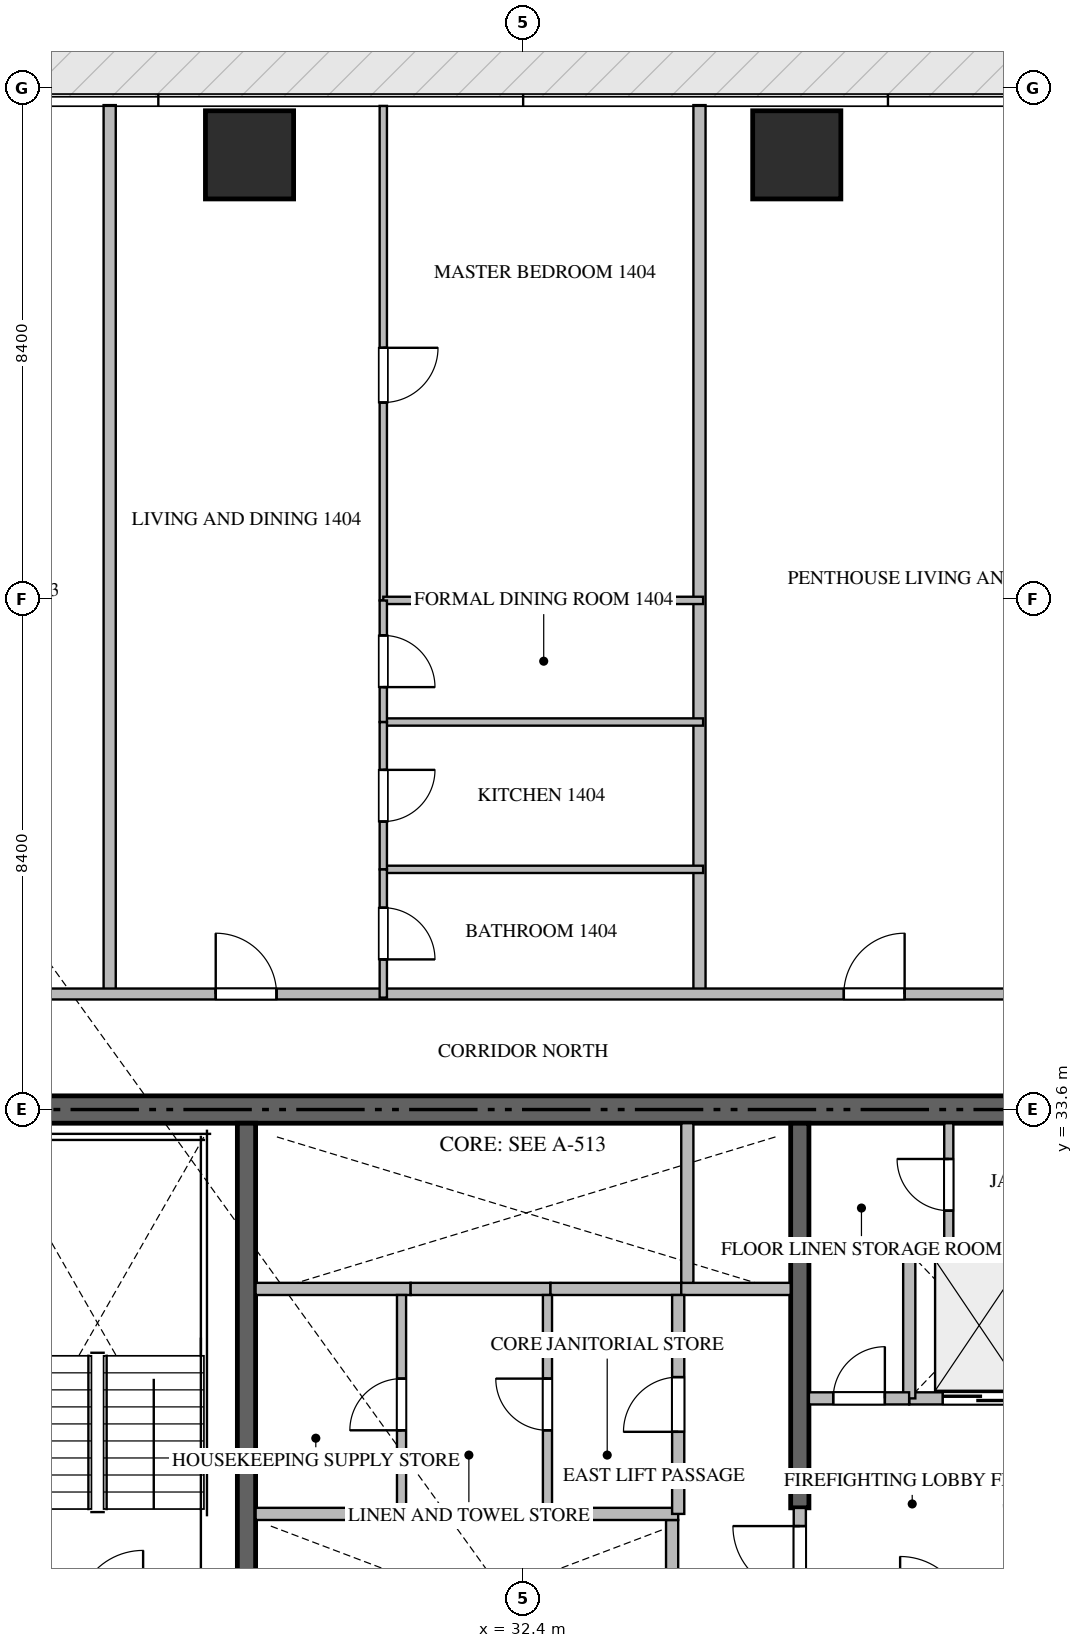
"""IFC4 building model, lengths in metres.
Left out: names, types, materials, properties, quantities, classifications, styles, units other than length and angle.
Written with IfcOpenShell. Run it as: python <this file> out.ifc"""

import sys

from ifc_helpers import new_model, si_unit, direction, frame, frame_2d, origin, origin_2d, place, context, subcontext, project, spatial, rectangle, extrude, source, transform, mapped, element, fill, save


model = new_model("IFC4")
c1 = context("Model", 3, precision=1e-05, world=origin(), true_north=direction((0.0, 1.0)))
c2 = subcontext(c1, "Body", "Model", "MODEL_VIEW")
j1 = project(units=[si_unit("LENGTHUNIT", "METRE"), si_unit("PLANEANGLEUNIT", "RADIAN")], contexts=[c1])
p1 = place(None, origin())
s1 = spatial("IfcSite", under=j1, at=p1, CompositionType="ELEMENT")
p2 = place(p1, origin())
s2 = spatial("IfcBuilding", under=s1, at=p2, CompositionType="ELEMENT")
p3 = place(p2, frame((0.0, 0.0, 60.45)))
s3 = spatial("IfcBuildingStorey", under=s2, at=p3, CompositionType="ELEMENT", Elevation=60.45)
p4 = place(p3, frame((41.4, 33.6, -0.26), z_axis=(0.0, 0.0, 1.0), x_axis=(-1.0, 0.0, 0.0)))
e1 = element("IfcWall", 1, at=p4, inside=s3, PredefinedType="SHEAR", context=c2, shape_type="SweptSolid", body=[
    extrude(rectangle(XDim=18.0, YDim=0.45, at=frame_2d((9.0, 0.0))), origin(), (0.0, 0.0, 1.0), 3.748),
])
p5 = place(p3, frame((27.85, 23.55, -0.26), z_axis=(0.0, 0.0, 1.0), x_axis=(0.0, 1.0, 0.0)))
e2 = element("IfcWall", 2, at=p5, inside=s3, PredefinedType="SHEAR", context=c2, shape_type="SweptSolid", body=[
    extrude(rectangle(XDim=9.825, YDim=0.3, at=frame_2d((4.913, 0.0))), origin(), (0.0, 0.0, 1.0), 3.748),
])
p6 = place(p3, frame((36.95, 27.05, -0.26), z_axis=(0.0, 0.0, 1.0), x_axis=(0.0, 1.0, 0.0)))
e3 = element("IfcWall", 3, at=p6, inside=s3, PredefinedType="SHEAR", context=c2, shape_type="SweptSolid", body=[
    extrude(rectangle(XDim=6.325, YDim=0.3, at=frame_2d((3.163, 0.0))), origin(), (0.0, 0.0, 1.0), 3.748),
])
m1 = source(origin(), c2, "Body", "SweptSolid", [
    extrude(rectangle(XDim=1.45, YDim=1.45, at=origin_2d()), origin(), (0.0, 0.0, 1.0), 3.75),
])
for number, where, z_axis, x_axis in (
    (4, (27.9, 49.3, -0.26), (0.0, 0.0, 1.0), (1.0, 0.0, 0.0)),
    (5, (36.9, 49.3, -0.26), (0.0, 0.0, 1.0), (1.0, 0.0, 0.0)),
):
    element("IfcColumn", number, at=place(p3, frame(where, z_axis=z_axis, x_axis=x_axis)), inside=s3, PredefinedType="COLUMN", context=c2, shape_type="MappedRepresentation", body=[
        mapped(m1, transform((0.0, 0.0, 0.0), scale=1.0)),
    ])
p7 = place(p3, frame((38.75, 28.85, 0.0), z_axis=(0.0, 0.0, 1.0), x_axis=(1.0, 0.0, 0.0)))
e6 = element("IfcWall", 6, at=p7, inside=s3, PredefinedType="STANDARD", context=c2, shape_type="SweptSolid", body=[
    extrude(rectangle(XDim=2.425, YDim=0.2, at=frame_2d((1.212, 0.0))), origin(), (0.0, 0.0, 1.0), 3.49),
])
p8 = place(p7, frame((0.55, 0.0, 0.0)))
e7 = element("IfcOpeningElement", 7, at=p8, cuts=e6, PredefinedType="OPENING", context=c2, shape_type="SweptSolid", body=[
    extrude(rectangle(XDim=1.2, YDim=2.2, at=frame_2d((0.6, 1.1))), frame((0.0, 0.11, 0.0), z_axis=(0.0, -1.0, 0.0), x_axis=(1.0, 0.0, 0.0)), (0.0, 0.0, 1.0), 0.22),
])
p9 = place(p3, frame((34.85, 24.35, 0.0), z_axis=(0.0, 0.0, 1.0), x_axis=(0.0, 1.0, 0.0)))
e8 = element("IfcWall", 8, at=p9, inside=s3, PredefinedType="STANDARD", context=c2, shape_type="SweptSolid", body=[
    extrude(rectangle(XDim=2.5, YDim=0.2, at=frame_2d((1.25, 0.0))), origin(), (0.0, 0.0, 1.0), 3.49),
])
p10 = place(p3, frame((28.0, 30.65, 0.0), z_axis=(0.0, 0.0, 1.0), x_axis=(1.0, 0.0, 0.0)))
e9 = element("IfcWall", 9, at=p10, inside=s3, PredefinedType="STANDARD", context=c2, shape_type="SweptSolid", body=[
    extrude(rectangle(XDim=2.55, YDim=0.2, at=frame_2d((1.275, 0.0))), origin(), (0.0, 0.0, 1.0), 3.49),
])
p11 = place(p3, frame((30.55, 30.65, 0.0), z_axis=(0.0, 0.0, 1.0), x_axis=(1.0, 0.0, 0.0)))
e10 = element("IfcWall", 10, at=p11, inside=s3, PredefinedType="STANDARD", context=c2, shape_type="SweptSolid", body=[
    extrude(rectangle(XDim=2.3, YDim=0.2, at=frame_2d((1.15, 0.0))), origin(), (0.0, 0.0, 1.0), 3.49),
])
p12 = place(p3, frame((32.85, 30.65, 0.0), z_axis=(0.0, 0.0, 1.0), x_axis=(1.0, 0.0, 0.0)))
e11 = element("IfcWall", 11, at=p12, inside=s3, PredefinedType="STANDARD", context=c2, shape_type="SweptSolid", body=[
    extrude(rectangle(XDim=2.15, YDim=0.2, at=frame_2d((1.075, 0.0))), origin(), (0.0, 0.0, 1.0), 3.49),
])
p13 = place(p3, frame((35.0, 30.65, 0.0), z_axis=(0.0, 0.0, 1.0), x_axis=(1.0, 0.0, 0.0)))
e12 = element("IfcWall", 12, at=p13, inside=s3, PredefinedType="STANDARD", context=c2, shape_type="SweptSolid", body=[
    extrude(rectangle(XDim=1.8, YDim=0.2, at=frame_2d((0.9, 0.0))), origin(), (0.0, 0.0, 1.0), 3.49),
])
p14 = place(p3, frame((35.1, 30.75, 0.0), z_axis=(0.0, 0.0, 1.0), x_axis=(0.0, 1.0, 0.0)))
e13 = element("IfcWall", 13, at=p14, inside=s3, PredefinedType="STANDARD", context=c2, shape_type="SweptSolid", body=[
    extrude(rectangle(XDim=2.625, YDim=0.2, at=frame_2d((1.312, 0.0))), origin(), (0.0, 0.0, 1.0), 3.49),
])
p15 = place(p3, frame((38.75, 28.85, 0.0), z_axis=(0.0, 0.0, 1.0), x_axis=(0.0, 1.0, 0.0)))
e14 = element("IfcWall", 14, at=p15, inside=s3, PredefinedType="STANDARD", context=c2, shape_type="SweptSolid", body=[
    extrude(rectangle(XDim=2.5, YDim=0.2, at=frame_2d((1.25, 0.0))), origin(), (0.0, 0.0, 1.0), 3.49),
])
p16 = place(p3, frame((38.75, 31.35, 0.0), z_axis=(0.0, 0.0, 1.0), x_axis=(1.0, 0.0, 0.0)))
e15 = element("IfcWall", 15, at=p16, inside=s3, PredefinedType="STANDARD", context=c2, shape_type="SweptSolid", body=[
    extrude(rectangle(XDim=2.425, YDim=0.2, at=frame_2d((1.212, 0.0))), origin(), (0.0, 0.0, 1.0), 3.49),
])
p17 = place(p3, frame((37.1, 28.85, 0.0), z_axis=(0.0, 0.0, 1.0), x_axis=(1.0, 0.0, 0.0)))
e16 = element("IfcWall", 16, at=p17, inside=s3, PredefinedType="STANDARD", context=c2, shape_type="SweptSolid", body=[
    extrude(rectangle(XDim=1.648, YDim=0.2, at=frame_2d((0.824, 0.0))), origin(), (0.0, 0.0, 1.0), 3.49),
])
p18 = place(p17, frame((0.399, 0.0, 0.0)))
e17 = element("IfcOpeningElement", 17, at=p18, cuts=e16, PredefinedType="OPENING", context=c2, shape_type="SweptSolid", body=[
    extrude(rectangle(XDim=0.85, YDim=2.1, at=frame_2d((0.425, 1.05))), frame((0.0, 0.11, 0.0), z_axis=(0.0, -1.0, 0.0), x_axis=(1.0, 0.0, 0.0)), (0.0, 0.0, 1.0), 0.22),
])
p19 = place(p3, frame((36.95, 25.352, 0.0), z_axis=(0.0, 0.0, 1.0), x_axis=(0.0, 1.0, 0.0)))
e18 = element("IfcWall", 18, at=p19, inside=s3, PredefinedType="STANDARD", context=c2, shape_type="SweptSolid", body=[
    extrude(rectangle(XDim=1.696, YDim=0.2, at=frame_2d((0.848, 0.0))), origin(), (0.0, 0.0, 1.0), 3.49),
])
p20 = place(p19, frame((0.298, 0.0, 0.0)))
e19 = element("IfcOpeningElement", 19, at=p20, cuts=e18, PredefinedType="OPENING", context=c2, shape_type="SweptSolid", body=[
    extrude(rectangle(XDim=1.1, YDim=2.15, at=frame_2d((0.55, 1.075))), frame((0.0, 0.11, 0.0), z_axis=(0.0, -1.0, 0.0), x_axis=(1.0, 0.0, 0.0)), (0.0, 0.0, 1.0), 0.22),
])
p21 = place(p3, frame((28.0, 26.95, 0.0), z_axis=(0.0, 0.0, 1.0), x_axis=(1.0, 0.0, 0.0)))
e20 = element("IfcWall", 20, at=p21, inside=s3, PredefinedType="STANDARD", context=c2, shape_type="SweptSolid", body=[
    extrude(rectangle(XDim=6.95, YDim=0.2, at=frame_2d((3.475, 0.0))), origin(), (0.0, 0.0, 1.0), 3.49),
])
p22 = place(p3, frame((39.4, 31.35, 0.0), z_axis=(0.0, 0.0, 1.0), x_axis=(0.0, 1.0, 0.0)))
e21 = element("IfcWall", 21, at=p22, inside=s3, PredefinedType="PARTITIONING", context=c2, shape_type="SweptSolid", body=[
    extrude(rectangle(XDim=2.025, YDim=0.15, at=frame_2d((1.012, 0.0))), origin(), (0.0, 0.0, 1.0), 3.49),
])
p23 = place(p22, frame((0.587, 0.0, 0.0)))
e22 = element("IfcOpeningElement", 22, at=p23, cuts=e21, PredefinedType="OPENING", context=c2, shape_type="SweptSolid", body=[
    extrude(rectangle(XDim=0.85, YDim=2.1, at=frame_2d((0.425, 1.05))), frame((0.0, 0.085, 0.0), z_axis=(0.0, -1.0, 0.0), x_axis=(1.0, 0.0, 0.0)), (0.0, 0.0, 1.0), 0.17),
])
p24 = place(p3, frame((34.95, 26.95, 0.0), z_axis=(0.0, 0.0, 1.0), x_axis=(0.0, 1.0, 0.0)))
e23 = element("IfcWall", 23, at=p24, inside=s3, PredefinedType="STANDARD", context=c2, shape_type="SweptSolid", body=[
    extrude(rectangle(XDim=3.6, YDim=0.2, at=frame_2d((1.8, 0.0))), origin(), (0.0, 0.0, 1.0), 3.49),
])
p25 = place(p24, frame((1.35, 0.0, 0.0)))
e24 = element("IfcOpeningElement", 24, at=p25, cuts=e23, PredefinedType="OPENING", context=c2, shape_type="SweptSolid", body=[
    extrude(rectangle(XDim=0.9, YDim=2.1, at=frame_2d((0.45, 1.05))), frame((0.0, 0.11, 0.0), z_axis=(0.0, -1.0, 0.0), x_axis=(1.0, 0.0, 0.0)), (0.0, 0.0, 1.0), 0.22),
])
p26 = place(p3, frame((32.8, 26.95, 0.0), z_axis=(0.0, 0.0, 1.0), x_axis=(0.0, 1.0, 0.0)))
e25 = element("IfcWall", 25, at=p26, inside=s3, PredefinedType="PARTITIONING", context=c2, shape_type="SweptSolid", body=[
    extrude(rectangle(XDim=3.6, YDim=0.15, at=frame_2d((1.8, 0.0))), origin(), (0.0, 0.0, 1.0), 3.49),
])
p27 = place(p26, frame((1.375, 0.0, 0.0)))
e26 = element("IfcOpeningElement", 26, at=p27, cuts=e25, PredefinedType="OPENING", context=c2, shape_type="SweptSolid", body=[
    extrude(rectangle(XDim=0.85, YDim=2.1, at=frame_2d((0.425, 1.05))), frame((0.0, 0.085, 0.0), z_axis=(0.0, -1.0, 0.0), x_axis=(1.0, 0.0, 0.0)), (0.0, 0.0, 1.0), 0.17),
])
p28 = place(p3, frame((30.4, 26.95, 0.0), z_axis=(0.0, 0.0, 1.0), x_axis=(0.0, 1.0, 0.0)))
e27 = element("IfcWall", 27, at=p28, inside=s3, PredefinedType="PARTITIONING", context=c2, shape_type="SweptSolid", body=[
    extrude(rectangle(XDim=3.6, YDim=0.15, at=frame_2d((1.8, 0.0))), origin(), (0.0, 0.0, 1.0), 3.49),
])
p29 = place(p28, frame((1.375, 0.0, 0.0)))
e28 = element("IfcOpeningElement", 28, at=p29, cuts=e27, PredefinedType="OPENING", context=c2, shape_type="SweptSolid", body=[
    extrude(rectangle(XDim=0.85, YDim=2.1, at=frame_2d((0.425, 1.05))), frame((0.0, 0.085, 0.0), z_axis=(0.0, -1.0, 0.0), x_axis=(1.0, 0.0, 0.0)), (0.0, 0.0, 1.0), 0.17),
])
for number, where, z_axis, x_axis in (
    (29, (25.6, 35.5, 0.0), (0.0, 0.0, 1.0), (0.0, 1.0, 0.0)),
    (30, (35.3, 35.5, 0.0), (0.0, 0.0, 1.0), (0.0, 1.0, 0.0)),
):
    element("IfcWall", number, at=place(p3, frame(where, z_axis=z_axis, x_axis=x_axis)), inside=s3, PredefinedType="PARTITIONING", context=c2, shape_type="SweptSolid", body=[
        extrude(rectangle(XDim=14.618, YDim=0.2, at=frame_2d((7.309, 0.0))), origin(), (0.0, 0.0, 1.0), 3.49),
    ])
p30 = place(p3, frame((21.402, 35.5, 0.0), z_axis=(0.0, 0.0, 1.0), x_axis=(1.0, 0.0, 0.0)))
e31 = element("IfcWall", 31, at=p30, inside=s3, PredefinedType="PARTITIONING", context=c2, shape_type="SweptSolid", body=[
    extrude(rectangle(XDim=21.996, YDim=0.18, at=frame_2d((10.998, 0.0))), origin(), (0.0, 0.0, 1.0), 3.49),
])
p31 = place(p30, frame((2.1, 0.0, 0.0)))
e32 = element("IfcOpeningElement", 32, at=p31, cuts=e31, PredefinedType="OPENING", context=c2, shape_type="SweptSolid", body=[
    extrude(rectangle(XDim=1.0, YDim=2.15, at=frame_2d((0.5, 1.075))), frame((0.0, 0.1, 0.0), z_axis=(0.0, -1.0, 0.0), x_axis=(1.0, 0.0, 0.0)), (0.0, 0.0, 1.0), 0.2),
])
p32 = place(p30, frame((5.942, 0.0, 0.0)))
e33 = element("IfcOpeningElement", 33, at=p32, cuts=e31, PredefinedType="OPENING", context=c2, shape_type="SweptSolid", body=[
    extrude(rectangle(XDim=1.0, YDim=2.15, at=frame_2d((0.5, 1.075))), frame((0.0, 0.1, 0.0), z_axis=(0.0, -1.0, 0.0), x_axis=(1.0, 0.0, 0.0)), (0.0, 0.0, 1.0), 0.2),
])
p33 = place(p30, frame((16.272, 0.0, 0.0)))
e34 = element("IfcOpeningElement", 34, at=p33, cuts=e31, PredefinedType="OPENING", context=c2, shape_type="SweptSolid", body=[
    extrude(rectangle(XDim=1.0, YDim=2.15, at=frame_2d((0.5, 1.075))), frame((0.0, 0.1, 0.0), z_axis=(0.0, -1.0, 0.0), x_axis=(1.0, 0.0, 0.0)), (0.0, 0.0, 1.0), 0.2),
])
p34 = place(p3, frame((30.1, 50.105, 0.0), z_axis=(0.0, 0.0, 1.0), x_axis=(0.0, -1.0, 0.0)))
e35 = element("IfcWall", 35, at=p34, inside=s3, PredefinedType="PARTITIONING", context=c2, shape_type="SweptSolid", body=[
    extrude(rectangle(XDim=8.132, YDim=0.12, at=frame_2d((4.066, 0.0))), origin(), (0.0, 0.0, 1.0), 3.49),
])
p35 = place(p34, frame((3.978, 0.0, 0.0)))
e36 = element("IfcOpeningElement", 36, at=p35, cuts=e35, PredefinedType="OPENING", context=c2, shape_type="SweptSolid", body=[
    extrude(rectangle(XDim=0.9, YDim=2.1, at=frame_2d((0.45, 1.05))), frame((0.0, 0.07, 0.0), z_axis=(0.0, -1.0, 0.0), x_axis=(1.0, 0.0, 0.0)), (0.0, 0.0, 1.0), 0.14),
])
for number, where, z_axis, x_axis in (
    (37, (30.1, 41.973, 0.0), (0.0, 0.0, 1.0), (1.0, 0.0, 0.0)),
    (38, (30.1, 39.973, 0.0), (0.0, 0.0, 1.0), (1.0, 0.0, 0.0)),
    (39, (30.1, 37.55, 0.0), (0.0, 0.0, 1.0), (1.0, 0.0, 0.0)),
):
    element("IfcWall", number, at=place(p3, frame(where, z_axis=z_axis, x_axis=x_axis)), inside=s3, PredefinedType="PARTITIONING", context=c2, shape_type="SweptSolid", body=[
        extrude(rectangle(XDim=5.26, YDim=0.12, at=frame_2d((2.63, 0.0))), origin(), (0.0, 0.0, 1.0), 3.49),
    ])
p36 = place(p3, frame((30.1, 41.971, 0.0), z_axis=(0.0, 0.0, 1.0), x_axis=(0.0, -1.0, 0.0)))
e40 = element("IfcWall", 40, at=p36, inside=s3, PredefinedType="PARTITIONING", context=c2, shape_type="SweptSolid", body=[
    extrude(rectangle(XDim=1.998, YDim=0.12, at=frame_2d((0.999, 0.0))), origin(), (0.0, 0.0, 1.0), 3.49),
])
p37 = place(p36, frame((0.574, 0.0, 0.0)))
e41 = element("IfcOpeningElement", 41, at=p37, cuts=e40, PredefinedType="OPENING", context=c2, shape_type="SweptSolid", body=[
    extrude(rectangle(XDim=0.85, YDim=2.1, at=frame_2d((0.425, 1.05))), frame((0.0, 0.07, 0.0), z_axis=(0.0, -1.0, 0.0), x_axis=(1.0, 0.0, 0.0)), (0.0, 0.0, 1.0), 0.14),
])
p38 = place(p3, frame((30.1, 39.971, 0.0), z_axis=(0.0, 0.0, 1.0), x_axis=(0.0, -1.0, 0.0)))
e42 = element("IfcWall", 42, at=p38, inside=s3, PredefinedType="PARTITIONING", context=c2, shape_type="SweptSolid", body=[
    extrude(rectangle(XDim=2.421, YDim=0.12, at=frame_2d((1.21, 0.0))), origin(), (0.0, 0.0, 1.0), 3.49),
])
p39 = place(p38, frame((0.785, 0.0, 0.0)))
e43 = element("IfcOpeningElement", 43, at=p39, cuts=e42, PredefinedType="OPENING", context=c2, shape_type="SweptSolid", body=[
    extrude(rectangle(XDim=0.85, YDim=2.1, at=frame_2d((0.425, 1.05))), frame((0.0, 0.07, 0.0), z_axis=(0.0, -1.0, 0.0), x_axis=(1.0, 0.0, 0.0)), (0.0, 0.0, 1.0), 0.14),
])
p40 = place(p3, frame((30.1, 37.548, 0.0), z_axis=(0.0, 0.0, 1.0), x_axis=(0.0, -1.0, 0.0)))
e44 = element("IfcWall", 44, at=p40, inside=s3, PredefinedType="PARTITIONING", context=c2, shape_type="SweptSolid", body=[
    extrude(rectangle(XDim=2.108, YDim=0.12, at=frame_2d((1.054, 0.0))), origin(), (0.0, 0.0, 1.0), 3.49),
])
p41 = place(p40, frame((0.629, 0.0, 0.0)))
e45 = element("IfcOpeningElement", 45, at=p41, cuts=e44, PredefinedType="OPENING", context=c2, shape_type="SweptSolid", body=[
    extrude(rectangle(XDim=0.85, YDim=2.1, at=frame_2d((0.425, 1.05))), frame((0.0, 0.07, 0.0), z_axis=(0.0, -1.0, 0.0), x_axis=(1.0, 0.0, 0.0)), (0.0, 0.0, 1.0), 0.14),
])
m2 = source(origin(), c2, "Body", "SweptSolid", [
    extrude(rectangle(XDim=1.2, YDim=2.2, at=frame_2d((0.6, 1.1))), frame((0.0, 0.025, 0.0), z_axis=(0.0, -1.0, 0.0), x_axis=(1.0, 0.0, 0.0)), (0.0, 0.0, 1.0), 0.05),
])
p42 = place(p8, origin())
e46 = element("IfcDoor", 46, at=p42, inside=s3, OperationType="DOUBLE_DOOR_SLIDING", PredefinedType="DOOR", context=c2, shape_type="MappedRepresentation", body=[
    mapped(m2, transform((0.0, 0.0, 0.0), scale=1.0)),
])
fill(e7, e46)
m3 = source(origin(), c2, "Body", "SweptSolid", [
    extrude(rectangle(XDim=0.85, YDim=2.1, at=frame_2d((0.425, 1.05))), frame((0.0, 0.025, 0.0), z_axis=(0.0, -1.0, 0.0), x_axis=(1.0, 0.0, 0.0)), (0.0, 0.0, 1.0), 0.05),
])
p43 = place(p18, origin())
e47 = element("IfcDoor", 47, at=p43, inside=s3, OperationType="SINGLE_SWING_RIGHT", PredefinedType="DOOR", context=c2, shape_type="MappedRepresentation", body=[
    mapped(m3, transform((0.0, 0.0, 0.0), scale=1.0)),
])
fill(e17, e47)
m4 = source(origin(), c2, "Body", "SweptSolid", [
    extrude(rectangle(XDim=1.1, YDim=2.15, at=frame_2d((0.55, 1.075))), frame((0.0, 0.025, 0.0), z_axis=(0.0, -1.0, 0.0), x_axis=(1.0, 0.0, 0.0)), (0.0, 0.0, 1.0), 0.05),
])
p44 = place(p20, origin())
e48 = element("IfcDoor", 48, at=p44, inside=s3, OperationType="SINGLE_SWING_RIGHT", PredefinedType="DOOR", context=c2, shape_type="MappedRepresentation", body=[
    mapped(m4, transform((0.0, 0.0, 0.0), scale=1.0)),
])
fill(e19, e48)
p45 = place(p23, origin())
e49 = element("IfcDoor", 49, at=p45, inside=s3, OperationType="SINGLE_SWING_RIGHT", PredefinedType="DOOR", context=c2, shape_type="MappedRepresentation", body=[
    mapped(m3, transform((0.0, 0.0, 0.0), scale=1.0)),
])
fill(e22, e49)
m5 = source(origin(), c2, "Body", "SweptSolid", [
    extrude(rectangle(XDim=0.9, YDim=2.1, at=frame_2d((0.45, 1.05))), frame((0.0, 0.025, 0.0), z_axis=(0.0, -1.0, 0.0), x_axis=(1.0, 0.0, 0.0)), (0.0, 0.0, 1.0), 0.05),
])
p46 = place(p25, origin())
e50 = element("IfcDoor", 50, at=p46, inside=s3, OperationType="SINGLE_SWING_LEFT", PredefinedType="DOOR", context=c2, shape_type="MappedRepresentation", body=[
    mapped(m5, transform((0.0, 0.0, 0.0), scale=1.0)),
])
fill(e24, e50)
p47 = place(p27, origin())
e51 = element("IfcDoor", 51, at=p47, inside=s3, OperationType="SINGLE_SWING_RIGHT", PredefinedType="DOOR", context=c2, shape_type="MappedRepresentation", body=[
    mapped(m3, transform((0.0, 0.0, 0.0), scale=1.0)),
])
fill(e26, e51)
p48 = place(p29, origin())
e52 = element("IfcDoor", 52, at=p48, inside=s3, OperationType="SINGLE_SWING_LEFT", PredefinedType="DOOR", context=c2, shape_type="MappedRepresentation", body=[
    mapped(m3, transform((0.0, 0.0, 0.0), scale=1.0)),
])
fill(e28, e52)
m6 = source(origin(), c2, "Body", "SweptSolid", [
    extrude(rectangle(XDim=1.0, YDim=2.15, at=frame_2d((0.5, 1.075))), frame((0.0, 0.025, 0.0), z_axis=(0.0, -1.0, 0.0), x_axis=(1.0, 0.0, 0.0)), (0.0, 0.0, 1.0), 0.05),
])
p49 = place(p32, origin())
e53 = element("IfcDoor", 53, at=p49, inside=s3, OperationType="SINGLE_SWING_LEFT", PredefinedType="DOOR", context=c2, shape_type="MappedRepresentation", body=[
    mapped(m6, transform((0.0, 0.0, 0.0), scale=1.0)),
])
fill(e33, e53)
p50 = place(p33, origin())
e54 = element("IfcDoor", 54, at=p50, inside=s3, OperationType="SINGLE_SWING_RIGHT", PredefinedType="DOOR", context=c2, shape_type="MappedRepresentation", body=[
    mapped(m6, transform((0.0, 0.0, 0.0), scale=1.0)),
])
fill(e34, e54)
p51 = place(p35, origin())
e55 = element("IfcDoor", 55, at=p51, inside=s3, OperationType="SINGLE_SWING_LEFT", PredefinedType="DOOR", context=c2, shape_type="MappedRepresentation", body=[
    mapped(m5, transform((0.0, 0.0, 0.0), scale=1.0)),
])
fill(e36, e55)
p52 = place(p37, origin())
e56 = element("IfcDoor", 56, at=p52, inside=s3, OperationType="SINGLE_SWING_RIGHT", PredefinedType="DOOR", context=c2, shape_type="MappedRepresentation", body=[
    mapped(m3, transform((0.0, 0.0, 0.0), scale=1.0)),
])
fill(e41, e56)
p53 = place(p39, origin())
e57 = element("IfcDoor", 57, at=p53, inside=s3, OperationType="SINGLE_SWING_LEFT", PredefinedType="DOOR", context=c2, shape_type="MappedRepresentation", body=[
    mapped(m3, transform((0.0, 0.0, 0.0), scale=1.0)),
])
fill(e43, e57)
p54 = place(p41, origin())
e58 = element("IfcDoor", 58, at=p54, inside=s3, OperationType="SINGLE_SWING_RIGHT", PredefinedType="DOOR", context=c2, shape_type="MappedRepresentation", body=[
    mapped(m3, transform((0.0, 0.0, 0.0), scale=1.0)),
])
fill(e45, e58)
save(model, sys.argv[1])
